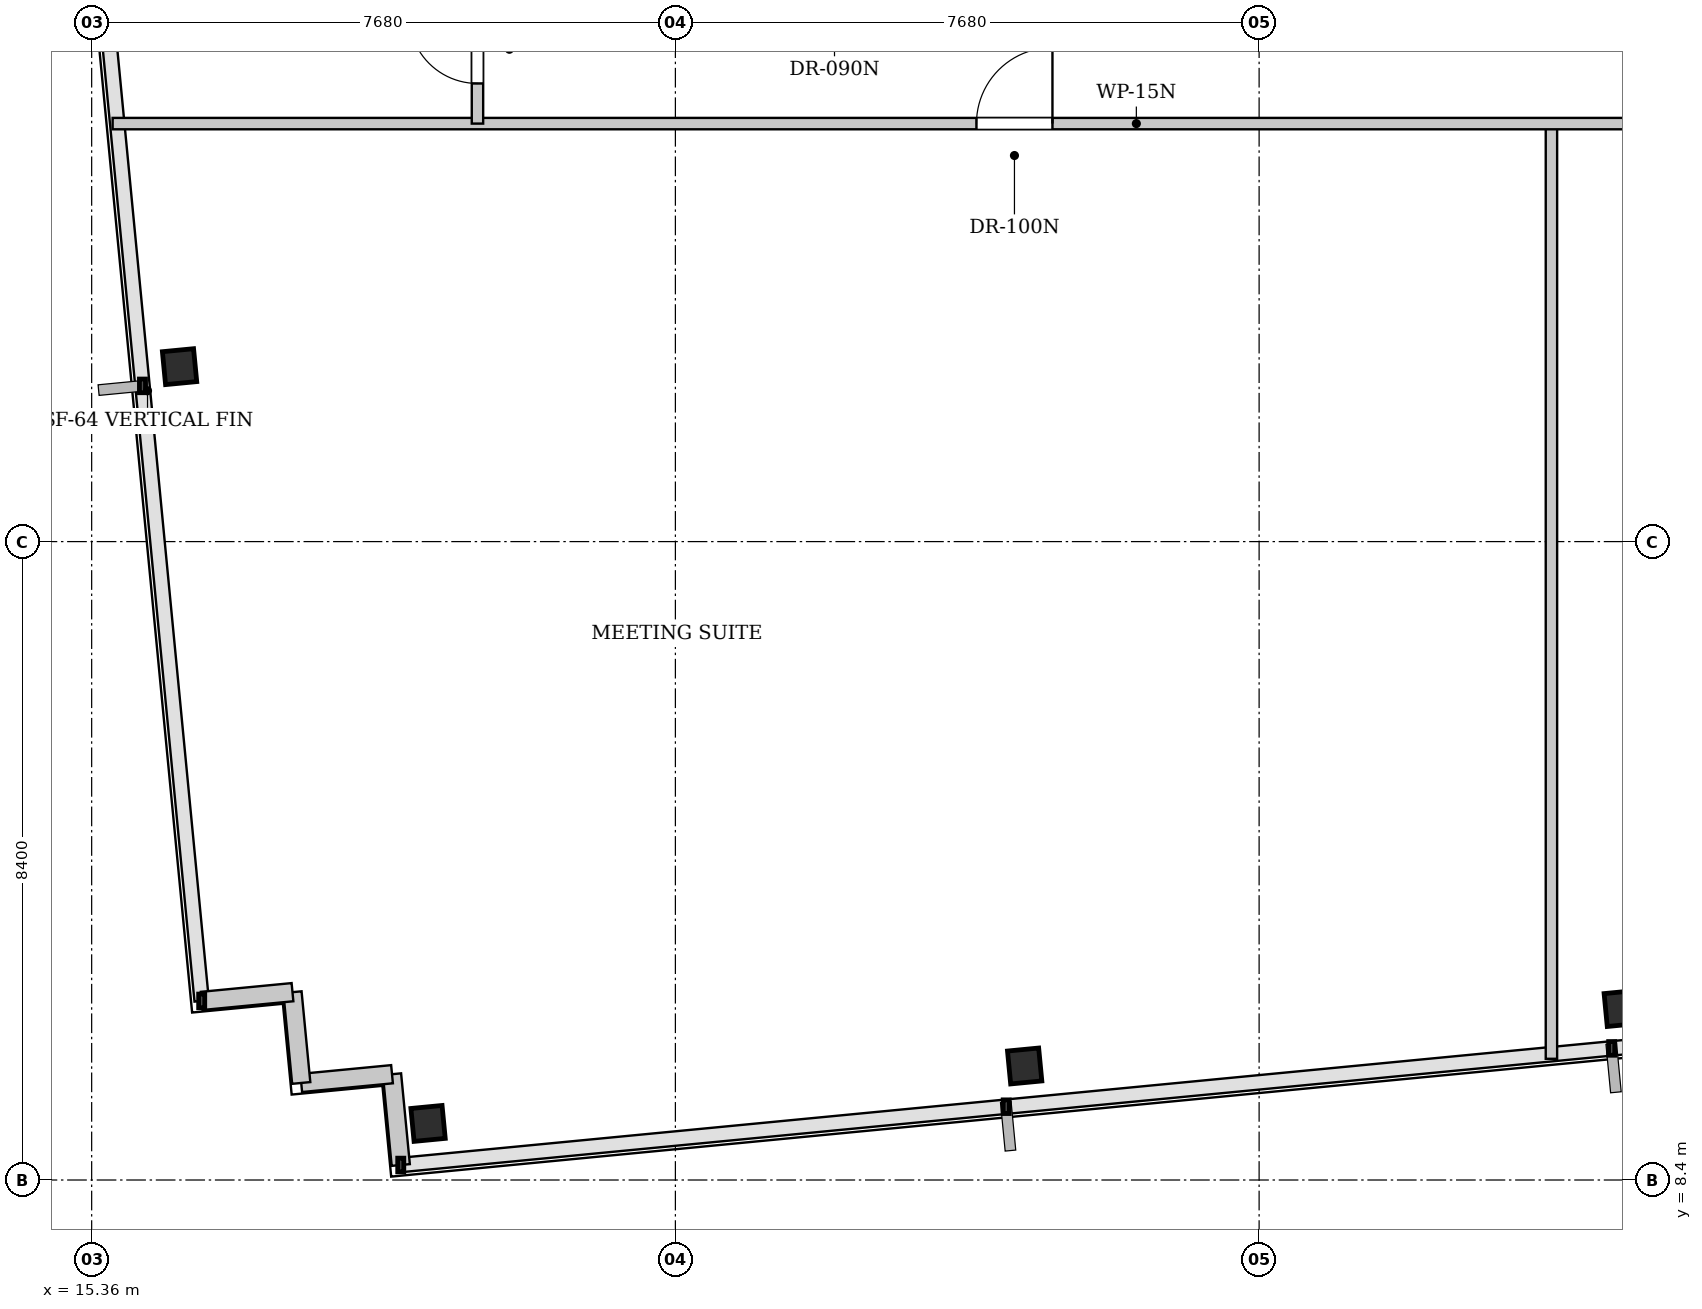
"""IFC4 building model, lengths in metres.
Left out: names, types, materials, properties, quantities, classifications, styles, units other than length and angle.
Written with IfcOpenShell. Run it as: python <this file> out.ifc"""

import sys

from ifc_helpers import new_model, si_unit, direction, frame, frame_2d, origin, origin_2d, place, context, subcontext, project, spatial, rectangle, i_section, extrude, element, fill, save


model = new_model("IFC4")
c1 = context("Model", 3, precision=1e-05, world=origin(), true_north=direction((0.0, 1.0)))
c2 = subcontext(c1, "Body", "Model", "MODEL_VIEW")
j1 = project(units=[si_unit("LENGTHUNIT", "METRE"), si_unit("PLANEANGLEUNIT", "RADIAN")], contexts=[c1])
p1 = place(None, origin())
s1 = spatial("IfcSite", under=j1, at=p1, CompositionType="ELEMENT")
p2 = place(p1, origin())
s2 = spatial("IfcBuilding", under=s1, at=p2, CompositionType="ELEMENT")
p3 = place(p2, frame((0.0, 0.0, 96.5)))
s3 = spatial("IfcBuildingStorey", under=s2, at=p3, CompositionType="ELEMENT", Elevation=96.5)
for number, where, z_axis, x_axis in (
    (1, (19.786, 9.144, 0.0), (0.0, 0.0, 1.0), (0.995, 0.096, 0.0)),
    (2, (27.635, 9.9, 0.0), (0.0, 0.0, 1.0), (0.995, 0.096, 0.0)),
    (3, (35.485, 10.656, 0.0), (0.0, 0.0, 1.0), (0.995, 0.096, 0.0)),
    (4, (16.517, 19.102, 0.0), (0.0, 0.0, 1.0), (0.995, 0.096, 0.0)),
):
    element("IfcColumn", number, at=place(p3, frame(where, z_axis=z_axis, x_axis=x_axis)), inside=s3, PredefinedType="COLUMN", context=c2, shape_type="SweptSolid", body=[
        extrude(i_section(OverallWidth=0.412, OverallDepth=0.435, WebThickness=0.036, FlangeThickness=0.058, FilletRadius=0.015, at=origin_2d()), origin(), (0.0, 0.0, 1.0), 3.4),
    ])
for number, where, z_axis, x_axis in (
    (5, (19.427, 8.597, 0.0), (0.0, 0.0, 1.0), (-0.096, 0.995, 0.0)),
    (6, (19.312, 9.792, 0.0), (0.0, 0.0, 1.0), (-0.995, -0.096, 0.0)),
):
    element("IfcWall", number, at=place(p3, frame(where, z_axis=z_axis, x_axis=x_axis)), inside=s3, PredefinedType="SOLIDWALL", context=c2, shape_type="SweptSolid", body=[
        extrude(rectangle(XDim=1.2, YDim=0.24, at=frame_2d((0.6, 0.0))), origin(), (0.0, 0.0, 1.0), 3.18),
    ])
p4 = place(p3, frame((18.117, 9.677, 0.0), z_axis=(0.0, 0.0, 1.0), x_axis=(-0.095836473879, 0.995397091755, 0.0)))
e7 = element("IfcWall", 7, at=p4, inside=s3, PredefinedType="SOLIDWALL", context=c2, shape_type="SweptSolid", body=[
    extrude(rectangle(XDim=1.2, YDim=0.24, at=frame_2d((0.6, 0.0))), origin(), (0.0, 0.0, 1.0), 3.18),
])
p5 = place(p3, frame((18.002, 10.871, 0.0), z_axis=(0.0, 0.0, 1.0), x_axis=(-0.995398960025, -0.095817067274, 0.0)))
e8 = element("IfcWall", 8, at=p5, inside=s3, PredefinedType="SOLIDWALL", context=c2, shape_type="SweptSolid", body=[
    extrude(rectangle(XDim=1.2, YDim=0.24, at=frame_2d((0.6, 0.0))), origin(), (0.0, 0.0, 1.0), 3.18),
])
p6 = place(p3, frame((34.566, 9.995, 0.0), z_axis=(0.0, 0.0, 1.0), x_axis=(0.0, 1.0, 0.0)))
e9 = element("IfcWall", 9, at=p6, inside=s3, PredefinedType="PARTITIONING", context=c2, shape_type="SweptSolid", body=[
    extrude(rectangle(XDim=12.325, YDim=0.15, at=frame_2d((6.163, 0.0))), origin(), (0.0, 0.0, 1.0), 3.18),
])
p7 = place(p3, frame((15.636, 22.3, 0.0), z_axis=(0.0, 0.0, 1.0), x_axis=(1.0, 0.0, 0.0)))
e10 = element("IfcWall", 10, at=p7, inside=s3, PredefinedType="PARTITIONING", context=c2, shape_type="SweptSolid", body=[
    extrude(rectangle(XDim=61.222, YDim=0.15, at=frame_2d((30.611, 0.0))), origin(), (0.0, 0.0, 1.0), 3.18),
])
p8 = place(p7, frame((11.365, 0.0, 0.0)))
e11 = element("IfcOpeningElement", 11, at=p8, cuts=e10, PredefinedType="OPENING", context=c2, shape_type="SweptSolid", body=[
    extrude(rectangle(XDim=1.0, YDim=2.15, at=frame_2d((0.5, 1.075))), frame((0.0, 0.085, 0.0), z_axis=(0.0, -1.0, 0.0), x_axis=(1.0, 0.0, 0.0)), (0.0, 0.0, 1.0), 0.17),
])
p9 = place(p7, frame((23.917, 0.0, 0.0)))
e12 = element("IfcOpeningElement", 12, at=p9, cuts=e10, PredefinedType="OPENING", context=c2, shape_type="SweptSolid", body=[
    extrude(rectangle(XDim=1.0, YDim=2.15, at=frame_2d((0.5, 1.075))), frame((0.0, 0.085, 0.0), z_axis=(0.0, -1.0, 0.0), x_axis=(1.0, 0.0, 0.0)), (0.0, 0.0, 1.0), 0.17),
])
p10 = place(p7, frame((34.89, 0.0, 0.0)))
e13 = element("IfcOpeningElement", 13, at=p10, cuts=e10, PredefinedType="OPENING", context=c2, shape_type="SweptSolid", body=[
    extrude(rectangle(XDim=1.0, YDim=2.15, at=frame_2d((0.5, 1.075))), frame((0.0, 0.085, 0.0), z_axis=(0.0, -1.0, 0.0), x_axis=(1.0, 0.0, 0.0)), (0.0, 0.0, 1.0), 0.17),
])
p11 = place(p7, frame((47.15, 0.0, 0.0)))
e14 = element("IfcOpeningElement", 14, at=p11, cuts=e10, PredefinedType="OPENING", context=c2, shape_type="SweptSolid", body=[
    extrude(rectangle(XDim=1.0, YDim=2.15, at=frame_2d((0.5, 1.075))), frame((0.0, 0.085, 0.0), z_axis=(0.0, -1.0, 0.0), x_axis=(1.0, 0.0, 0.0)), (0.0, 0.0, 1.0), 0.17),
])
p12 = place(p3, frame((20.436, 22.3, 0.0), z_axis=(0.0, 0.0, 1.0), x_axis=(0.0, 1.0, 0.0)))
e15 = element("IfcWall", 15, at=p12, inside=s3, PredefinedType="PARTITIONING", context=c2, shape_type="SweptSolid", body=[
    extrude(rectangle(XDim=23.948, YDim=0.15, at=frame_2d((11.974, 0.0))), origin(), (0.0, 0.0, 1.0), 3.18),
])
p13 = place(p12, frame((0.528, 0.0, 0.0)))
e16 = element("IfcOpeningElement", 16, at=p13, cuts=e15, PredefinedType="OPENING", context=c2, shape_type="SweptSolid", body=[
    extrude(rectangle(XDim=0.9, YDim=2.15, at=frame_2d((0.45, 1.075))), frame((0.0, 0.085, 0.0), z_axis=(0.0, -1.0, 0.0), x_axis=(1.0, 0.0, 0.0)), (0.0, 0.0, 1.0), 0.17),
])
p14 = place(p8, origin())
e17 = element("IfcDoor", 17, at=p14, inside=s3, OperationType="SINGLE_SWING_RIGHT", PredefinedType="DOOR", context=c2, shape_type="SweptSolid", body=[
    extrude(rectangle(XDim=1.0, YDim=2.15, at=frame_2d((0.5, 1.075))), frame((0.0, 0.025, 0.0), z_axis=(0.0, -1.0, 0.0), x_axis=(1.0, 0.0, 0.0)), (0.0, 0.0, 1.0), 0.05),
])
fill(e11, e17)
p15 = place(p13, origin())
e18 = element("IfcDoor", 18, at=p15, inside=s3, OperationType="SINGLE_SWING_RIGHT", PredefinedType="DOOR", context=c2, shape_type="SweptSolid", body=[
    extrude(rectangle(XDim=0.9, YDim=2.15, at=frame_2d((0.45, 1.075))), frame((0.0, 0.025, 0.0), z_axis=(0.0, -1.0, 0.0), x_axis=(1.0, 0.0, 0.0)), (0.0, 0.0, 1.0), 0.05),
])
fill(e16, e18)
save(model, sys.argv[1])
